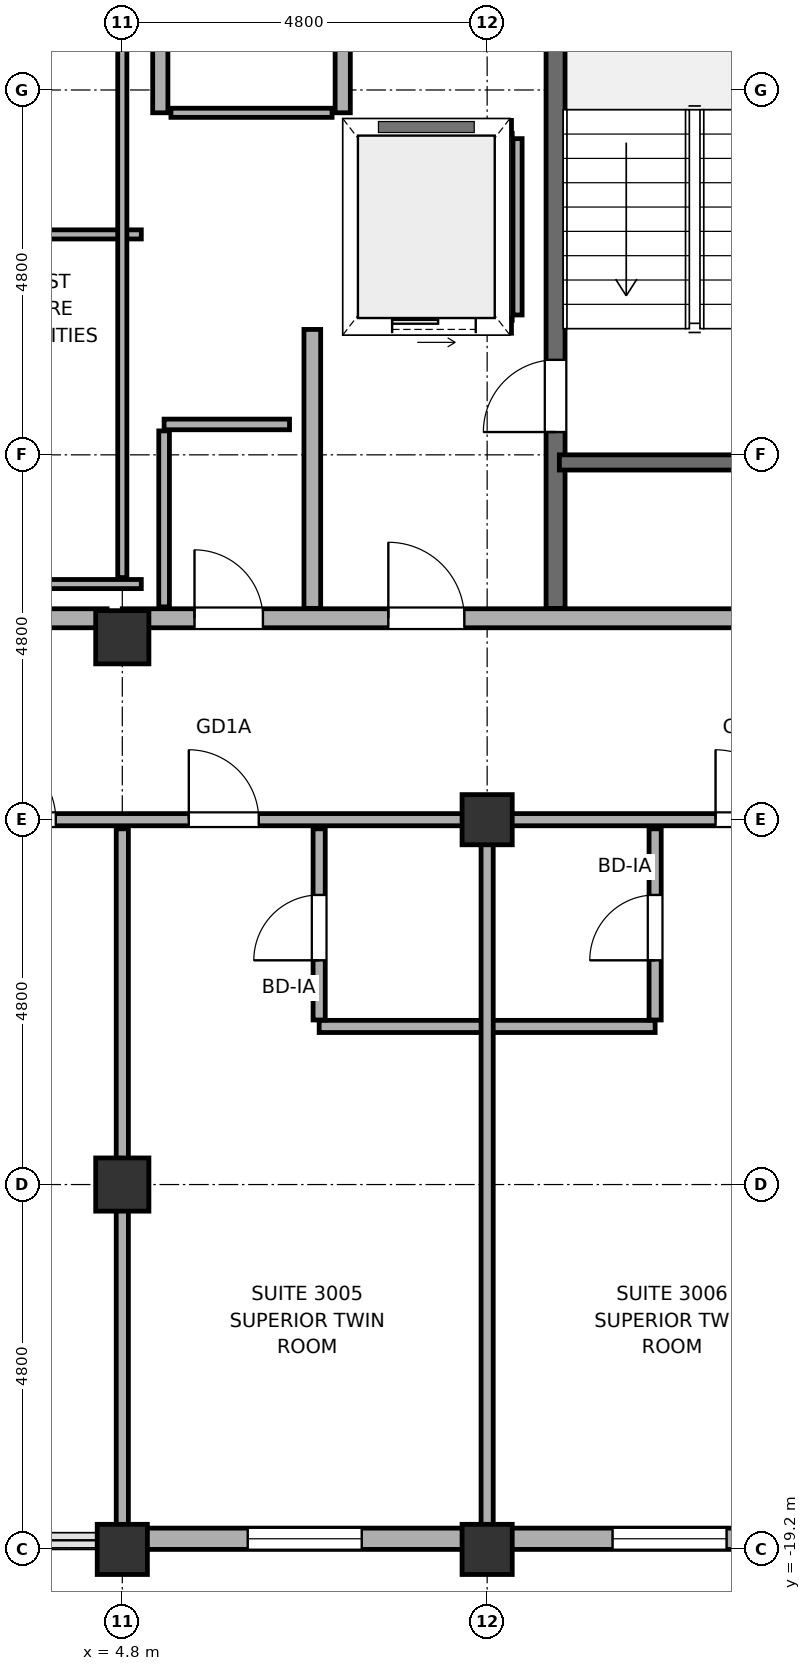
"""IFC4 building model, lengths in metres.
Left out: names, types, materials, properties, quantities, classifications, styles, units other than length and angle.
Written with IfcOpenShell. Run it as: python <this file> out.ifc"""

import sys

from ifc_helpers import new_model, si_unit, direction, frame, frame_2d, origin, origin_2d, place, context, subcontext, project, spatial, rectangle, hollow_rectangle, hollow_circle, extrude, element, fill, save


model = new_model("IFC4")
c1 = context("Model", 3, precision=1e-05, world=origin(), true_north=direction((0.0, 1.0)))
c2 = subcontext(c1, "Body", "Model", "MODEL_VIEW")
j1 = project(units=[si_unit("LENGTHUNIT", "METRE"), si_unit("PLANEANGLEUNIT", "RADIAN")], contexts=[c1])
p1 = place(None, origin())
s1 = spatial("IfcSite", under=j1, at=p1, CompositionType="ELEMENT")
p2 = place(p1, origin())
s2 = spatial("IfcBuilding", under=s1, at=p2, CompositionType="ELEMENT")
p3 = place(p2, frame((0.0, 0.0, 124.8)))
s3 = spatial("IfcBuildingStorey", under=s2, at=p3, CompositionType="ELEMENT", Elevation=124.8)
p4 = place(p3, frame((4.8, -19.2, 0.0), z_axis=(0.0, 0.0, 1.0), x_axis=(1.0, 0.0, 0.0)))
e1 = element("IfcColumn", 1, at=p4, inside=s3, PredefinedType="COLUMN", context=c2, shape_type="SweptSolid", body=[
    extrude(hollow_circle(Radius=0.33, WallThickness=0.028, at=origin_2d()), origin(), (0.0, 0.0, 1.0), 3.7),
])
for number, where, z_axis, x_axis in (
    (2, (4.8, -14.4, 0.0), (0.0, 0.0, 1.0), (1.0, 0.0, 0.0)),
    (3, (4.8, -7.2, 0.0), (0.0, 0.0, 1.0), (1.0, 0.0, 0.0)),
):
    element("IfcColumn", number, at=place(p3, frame(where, z_axis=z_axis, x_axis=x_axis)), inside=s3, PredefinedType="COLUMN", context=c2, shape_type="SweptSolid", body=[
        extrude(hollow_rectangle(XDim=0.7, YDim=0.7, WallThickness=0.032, at=origin_2d()), origin(), (0.0, 0.0, 1.0), 3.7),
    ])
for number, where, z_axis, x_axis in (
    (4, (9.6, -19.2, 0.0), (0.0, 0.0, 1.0), (1.0, 0.0, 0.0)),
    (5, (9.6, -9.6, 0.0), (0.0, 0.0, 1.0), (1.0, 0.0, 0.0)),
):
    element("IfcColumn", number, at=place(p3, frame(where, z_axis=z_axis, x_axis=x_axis)), inside=s3, PredefinedType="COLUMN", context=c2, shape_type="SweptSolid", body=[
        extrude(hollow_circle(Radius=0.33, WallThickness=0.028, at=origin_2d()), origin(), (0.0, 0.0, 1.0), 3.7),
    ])
p5 = place(p3, frame((4.75, -19.06, 0.0), z_axis=(0.0, 0.0, 1.0), x_axis=(1.0, 0.0, 0.0)))
e6 = element("IfcWall", 6, at=p5, inside=s3, PredefinedType="SOLIDWALL", context=c2, shape_type="SweptSolid", body=[
    extrude(rectangle(XDim=20.45, YDim=0.28, at=frame_2d((10.225, 0.0))), origin(), (0.0, 0.0, 1.0), 2.12),
])
p6 = place(p5, frame((11.817, 0.0, 0.75)))
e7 = element("IfcOpeningElement", 7, at=p6, cuts=e6, PredefinedType="OPENING", context=c2, shape_type="SweptSolid", body=[
    extrude(rectangle(XDim=1.5, YDim=1.15, at=frame_2d((0.75, 0.575))), frame((0.0, 0.155, 0.0), z_axis=(0.0, -1.0, 0.0), x_axis=(1.0, 0.0, 0.0)), (0.0, 0.0, 1.0), 0.31),
])
p7 = place(p5, frame((1.7, 0.0, 0.75)))
e8 = element("IfcOpeningElement", 8, at=p7, cuts=e6, PredefinedType="OPENING", context=c2, shape_type="SweptSolid", body=[
    extrude(rectangle(XDim=1.5, YDim=1.15, at=frame_2d((0.75, 0.575))), frame((0.0, 0.155, 0.0), z_axis=(0.0, -1.0, 0.0), x_axis=(1.0, 0.0, 0.0)), (0.0, 0.0, 1.0), 0.31),
])
p8 = place(p5, frame((6.5, 0.0, 0.75)))
e9 = element("IfcOpeningElement", 9, at=p8, cuts=e6, PredefinedType="OPENING", context=c2, shape_type="SweptSolid", body=[
    extrude(rectangle(XDim=1.5, YDim=1.15, at=frame_2d((0.75, 0.575))), frame((0.0, 0.155, 0.0), z_axis=(0.0, -1.0, 0.0), x_axis=(1.0, 0.0, 0.0)), (0.0, 0.0, 1.0), 0.31),
])
p9 = place(p3, frame((-4.6, -6.95, 0.0), z_axis=(0.0, 0.0, 1.0), x_axis=(1.0, 0.0, 0.0)))
e10 = element("IfcWall", 10, at=p9, inside=s3, PredefinedType="SOLIDWALL", context=c2, shape_type="SweptSolid", body=[
    extrude(rectangle(XDim=9.2, YDim=0.25, at=frame_2d((4.6, 0.0))), origin(), (0.0, 0.0, 1.0), 2.32),
])
p10 = place(p9, frame((0.8, 0.0, 0.0)))
e11 = element("IfcOpeningElement", 11, at=p10, cuts=e10, PredefinedType="OPENING", context=c2, shape_type="SweptSolid", body=[
    extrude(rectangle(XDim=1.2, YDim=2.2, at=frame_2d((0.6, 1.1))), frame((0.0, 0.14, 0.0), z_axis=(0.0, -1.0, 0.0), x_axis=(1.0, 0.0, 0.0)), (0.0, 0.0, 1.0), 0.28),
])
p11 = place(p9, frame((5.55, 0.0, 0.0)))
e12 = element("IfcOpeningElement", 12, at=p11, cuts=e10, PredefinedType="OPENING", context=c2, shape_type="SweptSolid", body=[
    extrude(rectangle(XDim=1.2, YDim=2.2, at=frame_2d((0.6, 1.1))), frame((0.0, 0.14, 0.0), z_axis=(0.0, -1.0, 0.0), x_axis=(1.0, 0.0, 0.0)), (0.0, 0.0, 1.0), 0.28),
])
p12 = place(p3, frame((4.8, -6.95, 0.0), z_axis=(0.0, 0.0, 1.0), x_axis=(1.0, 0.0, 0.0)))
e13 = element("IfcWall", 13, at=p12, inside=s3, PredefinedType="SOLIDWALL", context=c2, shape_type="SweptSolid", body=[
    extrude(rectangle(XDim=9.4, YDim=0.25, at=frame_2d((4.7, 0.0))), origin(), (0.0, 0.0, 1.0), 2.12),
])
p13 = place(p12, frame((3.5, 0.0, 0.0)))
e14 = element("IfcOpeningElement", 14, at=p13, cuts=e13, PredefinedType="OPENING", context=c2, shape_type="SweptSolid", body=[
    extrude(rectangle(XDim=1.0, YDim=2.02, at=frame_2d((0.5, 1.01))), frame((0.0, 0.14, 0.0), z_axis=(0.0, -1.0, 0.0), x_axis=(1.0, 0.0, 0.0)), (0.0, 0.0, 1.0), 0.28),
])
p14 = place(p12, frame((0.95, 0.0, 0.0)))
e15 = element("IfcOpeningElement", 15, at=p14, cuts=e13, PredefinedType="OPENING", context=c2, shape_type="SweptSolid", body=[
    extrude(rectangle(XDim=0.9, YDim=2.02, at=frame_2d((0.45, 1.01))), frame((0.0, 0.14, 0.0), z_axis=(0.0, -1.0, 0.0), x_axis=(1.0, 0.0, 0.0)), (0.0, 0.0, 1.0), 0.28),
])
p15 = place(p3, frame((7.3, -6.82, 0.0), z_axis=(0.0, 0.0, 1.0), x_axis=(0.0, 1.0, 0.0)))
e16 = element("IfcWall", 16, at=p15, inside=s3, PredefinedType="SOLIDWALL", context=c2, shape_type="SweptSolid", body=[
    extrude(rectangle(XDim=3.67, YDim=0.22, at=frame_2d((1.835, 0.0))), origin(), (0.0, 0.0, 1.0), 2.12),
])
p16 = place(p3, frame((10.5, -6.82, -0.18), z_axis=(0.0, 0.0, 1.0), x_axis=(0.0, 1.0, 0.0)))
e17 = element("IfcWall", 17, at=p16, inside=s3, PredefinedType="SOLIDWALL", context=c2, shape_type="SweptSolid", body=[
    extrude(rectangle(XDim=13.64, YDim=0.25, at=frame_2d((6.82, 0.0))), origin(), (0.0, 0.0, 1.0), 3.7),
])
p17 = place(p16, frame((2.32, 0.0, 0.18)))
e18 = element("IfcOpeningElement", 18, at=p17, cuts=e17, PredefinedType="OPENING", context=c2, shape_type="SweptSolid", body=[
    extrude(rectangle(XDim=0.95, YDim=2.15, at=frame_2d((0.475, 1.075))), frame((0.0, 0.14, 0.0), z_axis=(0.0, -1.0, 0.0), x_axis=(1.0, 0.0, 0.0)), (0.0, 0.0, 1.0), 0.28),
])
p18 = place(p3, frame((10.55, -4.9, -0.18), z_axis=(0.0, 0.0, 1.0), x_axis=(1.0, 0.0, 0.0)))
e19 = element("IfcWall", 19, at=p18, inside=s3, PredefinedType="SOLIDWALL", context=c2, shape_type="SweptSolid", body=[
    extrude(rectangle(XDim=3.65, YDim=0.2, at=frame_2d((1.825, 0.0))), origin(), (0.0, 0.0, 1.0), 3.7),
])
for number, where, z_axis, x_axis in (
    (20, (7.7, -0.3, 0.0), (0.0, 0.0, 1.0), (0.0, 1.0, 0.0)),
    (21, (5.3, -0.3, 0.0), (0.0, 0.0, 1.0), (0.0, 1.0, 0.0)),
):
    element("IfcWall", number, at=place(p3, frame(where, z_axis=z_axis, x_axis=x_axis)), inside=s3, PredefinedType="SOLIDWALL", context=c2, shape_type="SweptSolid", body=[
        extrude(rectangle(XDim=6.8, YDim=0.2, at=frame_2d((3.4, 0.0))), origin(), (0.0, 0.0, 1.0), 3.52),
    ])
p19 = place(p3, frame((5.44, -0.3, 0.0), z_axis=(0.0, 0.0, 1.0), x_axis=(1.0, 0.0, 0.0)))
e22 = element("IfcWall", 22, at=p19, inside=s3, PredefinedType="PARTITIONING", context=c2, shape_type="SweptSolid", body=[
    extrude(rectangle(XDim=2.12, YDim=0.12, at=frame_2d((1.06, 0.0))), origin(), (0.0, 0.0, 1.0), 3.52),
])
p20 = place(p3, frame((7.88, -3.1, 0.0), z_axis=(0.0, 0.0, 1.0), x_axis=(1.0, 0.0, 0.0)))
e23 = element("IfcWall", 23, at=p20, inside=s3, PredefinedType="SOLIDWALL", context=c2, shape_type="SweptSolid", body=[
    extrude(rectangle(XDim=2.04, YDim=0.2, at=frame_2d((1.02, 0.0))), origin(), (0.0, 0.0, 1.0), 3.52),
])
p21 = place(p20, frame((0.47, 0.0, 0.0)))
e24 = element("IfcOpeningElement", 24, at=p21, cuts=e23, PredefinedType="OPENING", context=c2, shape_type="SweptSolid", body=[
    extrude(rectangle(XDim=1.1, YDim=2.2, at=frame_2d((0.55, 1.1))), frame((0.0, 0.115, 0.0), z_axis=(0.0, -1.0, 0.0), x_axis=(1.0, 0.0, 0.0)), (0.0, 0.0, 1.0), 0.23),
])
p22 = place(p3, frame((7.88, -0.5, 0.0), z_axis=(0.0, 0.0, 1.0), x_axis=(1.0, 0.0, 0.0)))
e25 = element("IfcWall", 25, at=p22, inside=s3, PredefinedType="SOLIDWALL", context=c2, shape_type="SweptSolid", body=[
    extrude(rectangle(XDim=2.04, YDim=0.2, at=frame_2d((1.02, 0.0))), origin(), (0.0, 0.0, 1.0), 3.52),
])
for number, where, z_axis, x_axis in (
    (26, (7.8, -2.96, 0.0), (0.0, 0.0, 1.0), (0.0, 1.0, 0.0)),
    (27, (10.0, -2.96, 0.0), (0.0, 0.0, 1.0), (0.0, 1.0, 0.0)),
):
    element("IfcWall", number, at=place(p3, frame(where, z_axis=z_axis, x_axis=x_axis)), inside=s3, PredefinedType="PARTITIONING", context=c2, shape_type="SweptSolid", body=[
        extrude(rectangle(XDim=2.32, YDim=0.12, at=frame_2d((1.16, 0.0))), origin(), (0.0, 0.0, 1.0), 3.52),
    ])
p23 = place(p3, frame((7.39, -12.32, 0.0), z_axis=(0.0, 0.0, 1.0), x_axis=(1.0, 0.0, 0.0)))
e28 = element("IfcWall", 28, at=p23, inside=s3, PredefinedType="PARTITIONING", context=c2, shape_type="SweptSolid", body=[
    extrude(rectangle(XDim=4.42, YDim=0.16, at=frame_2d((2.21, 0.0))), origin(), (0.0, 0.0, 1.0), 3.12),
])
p24 = place(p3, frame((-14.32, -9.6, 0.0), z_axis=(0.0, 0.0, 1.0), x_axis=(1.0, 0.0, 0.0)))
e29 = element("IfcWall", 29, at=p24, inside=s3, PredefinedType="PARTITIONING", context=c2, shape_type="SweptSolid", body=[
    extrude(rectangle(XDim=28.64, YDim=0.16, at=frame_2d((14.32, 0.0))), origin(), (0.0, 0.0, 1.0), 2.12),
])
p25 = place(p24, frame((0.795, 0.0, 0.0)))
e30 = element("IfcOpeningElement", 30, at=p25, cuts=e29, PredefinedType="OPENING", context=c2, shape_type="SweptSolid", body=[
    extrude(rectangle(XDim=0.92, YDim=2.02, at=frame_2d((0.46, 1.01))), frame((0.0, 0.095, 0.0), z_axis=(0.0, -1.0, 0.0), x_axis=(1.0, 0.0, 0.0)), (0.0, 0.0, 1.0), 0.19),
])
p26 = place(p24, frame((7.725, 0.0, 0.0)))
e31 = element("IfcOpeningElement", 31, at=p26, cuts=e29, PredefinedType="OPENING", context=c2, shape_type="SweptSolid", body=[
    extrude(rectangle(XDim=0.92, YDim=2.02, at=frame_2d((0.46, 1.01))), frame((0.0, 0.095, 0.0), z_axis=(0.0, -1.0, 0.0), x_axis=(1.0, 0.0, 0.0)), (0.0, 0.0, 1.0), 0.19),
])
p27 = place(p24, frame((10.395, 0.0, 0.0)))
e32 = element("IfcOpeningElement", 32, at=p27, cuts=e29, PredefinedType="OPENING", context=c2, shape_type="SweptSolid", body=[
    extrude(rectangle(XDim=0.92, YDim=2.02, at=frame_2d((0.46, 1.01))), frame((0.0, 0.095, 0.0), z_axis=(0.0, -1.0, 0.0), x_axis=(1.0, 0.0, 0.0)), (0.0, 0.0, 1.0), 0.19),
])
p28 = place(p24, frame((17.325, 0.0, 0.0)))
e33 = element("IfcOpeningElement", 33, at=p28, cuts=e29, PredefinedType="OPENING", context=c2, shape_type="SweptSolid", body=[
    extrude(rectangle(XDim=0.92, YDim=2.02, at=frame_2d((0.46, 1.01))), frame((0.0, 0.095, 0.0), z_axis=(0.0, -1.0, 0.0), x_axis=(1.0, 0.0, 0.0)), (0.0, 0.0, 1.0), 0.19),
])
p29 = place(p24, frame((19.995, 0.0, 0.0)))
e34 = element("IfcOpeningElement", 34, at=p29, cuts=e29, PredefinedType="OPENING", context=c2, shape_type="SweptSolid", body=[
    extrude(rectangle(XDim=0.92, YDim=2.02, at=frame_2d((0.46, 1.01))), frame((0.0, 0.095, 0.0), z_axis=(0.0, -1.0, 0.0), x_axis=(1.0, 0.0, 0.0)), (0.0, 0.0, 1.0), 0.19),
])
p30 = place(p24, frame((26.925, 0.0, 0.0)))
e35 = element("IfcOpeningElement", 35, at=p30, cuts=e29, PredefinedType="OPENING", context=c2, shape_type="SweptSolid", body=[
    extrude(rectangle(XDim=0.92, YDim=2.02, at=frame_2d((0.46, 1.01))), frame((0.0, 0.095, 0.0), z_axis=(0.0, -1.0, 0.0), x_axis=(1.0, 0.0, 0.0)), (0.0, 0.0, 1.0), 0.19),
])
p31 = place(p3, frame((2.6, -6.5, 0.0), z_axis=(0.0, 0.0, 1.0), x_axis=(1.0, 0.0, 0.0)))
e36 = element("IfcWall", 36, at=p31, inside=s3, PredefinedType="PARTITIONING", context=c2, shape_type="SweptSolid", body=[
    extrude(rectangle(XDim=2.45, YDim=0.12, at=frame_2d((1.225, 0.0))), origin(), (0.0, 0.0, 1.0), 3.52),
])
p32 = place(p3, frame((5.35, -4.4, 0.0), z_axis=(0.0, 0.0, 1.0), x_axis=(1.0, 0.0, 0.0)))
e37 = element("IfcWall", 37, at=p32, inside=s3, PredefinedType="PLUMBINGWALL", context=c2, shape_type="SweptSolid", body=[
    extrude(rectangle(XDim=1.65, YDim=0.14, at=frame_2d((0.825, 0.0))), origin(), (0.0, 0.0, 1.0), 3.52),
])
p33 = place(p3, frame((2.6, -1.9, 0.0), z_axis=(0.0, 0.0, 1.0), x_axis=(1.0, 0.0, 0.0)))
e38 = element("IfcWall", 38, at=p33, inside=s3, PredefinedType="PARTITIONING", context=c2, shape_type="SweptSolid", body=[
    extrude(rectangle(XDim=2.45, YDim=0.12, at=frame_2d((1.225, 0.0))), origin(), (0.0, 0.0, 1.0), 3.52),
])
p34 = place(p3, frame((4.8, -18.91, 0.0), z_axis=(0.0, 0.0, 1.0), x_axis=(0.0, 1.0, 0.0)))
e39 = element("IfcWall", 39, at=p34, inside=s3, PredefinedType="PARTITIONING", context=c2, shape_type="SweptSolid", body=[
    extrude(rectangle(XDim=9.19, YDim=0.16, at=frame_2d((4.595, 0.0))), origin(), (0.0, 0.0, 1.0), 2.12),
])
p35 = place(p3, frame((4.8, -6.415, 0.0), z_axis=(0.0, 0.0, 1.0), x_axis=(0.0, 1.0, 0.0)))
e40 = element("IfcWall", 40, at=p35, inside=s3, PredefinedType="PARTITIONING", context=c2, shape_type="SweptSolid", body=[
    extrude(rectangle(XDim=9.165, YDim=0.12, at=frame_2d((4.583, 0.0))), origin(), (0.0, 0.0, 1.0), 3.52),
])
p36 = place(p3, frame((5.35, -6.8, 0.0), z_axis=(0.0, 0.0, 1.0), x_axis=(0.0, 1.0, 0.0)))
e41 = element("IfcWall", 41, at=p36, inside=s3, PredefinedType="PLUMBINGWALL", context=c2, shape_type="SweptSolid", body=[
    extrude(rectangle(XDim=2.315, YDim=0.14, at=frame_2d((1.157, 0.0))), origin(), (0.0, 0.0, 1.0), 2.12),
])
p37 = place(p3, frame((7.39, -12.235, 0.0), z_axis=(0.0, 0.0, 1.0), x_axis=(0.0, 1.0, 0.0)))
e42 = element("IfcWall", 42, at=p37, inside=s3, PredefinedType="PARTITIONING", context=c2, shape_type="SweptSolid", body=[
    extrude(rectangle(XDim=2.515, YDim=0.16, at=frame_2d((1.258, 0.0))), origin(), (0.0, 0.0, 1.0), 2.12),
])
p38 = place(p37, frame((0.785, 0.0, 0.0)))
e43 = element("IfcOpeningElement", 43, at=p38, cuts=e42, PredefinedType="OPENING", context=c2, shape_type="SweptSolid", body=[
    extrude(rectangle(XDim=0.86, YDim=2.02, at=frame_2d((0.43, 1.01))), frame((0.0, 0.095, 0.0), z_axis=(0.0, -1.0, 0.0), x_axis=(1.0, 0.0, 0.0)), (0.0, 0.0, 1.0), 0.19),
])
p39 = place(p3, frame((9.6, -18.91, 0.0), z_axis=(0.0, 0.0, 1.0), x_axis=(0.0, 1.0, 0.0)))
e44 = element("IfcWall", 44, at=p39, inside=s3, PredefinedType="PARTITIONING", context=c2, shape_type="SweptSolid", body=[
    extrude(rectangle(XDim=9.19, YDim=0.16, at=frame_2d((4.595, 0.0))), origin(), (0.0, 0.0, 1.0), 2.12),
])
p40 = place(p3, frame((11.81, -12.235, 0.0), z_axis=(0.0, 0.0, 1.0), x_axis=(0.0, 1.0, 0.0)))
e45 = element("IfcWall", 45, at=p40, inside=s3, PredefinedType="PARTITIONING", context=c2, shape_type="SweptSolid", body=[
    extrude(rectangle(XDim=2.515, YDim=0.16, at=frame_2d((1.258, 0.0))), origin(), (0.0, 0.0, 1.0), 2.12),
])
p41 = place(p40, frame((0.785, 0.0, 0.0)))
e46 = element("IfcOpeningElement", 46, at=p41, cuts=e45, PredefinedType="OPENING", context=c2, shape_type="SweptSolid", body=[
    extrude(rectangle(XDim=0.86, YDim=2.02, at=frame_2d((0.43, 1.01))), frame((0.0, 0.095, 0.0), z_axis=(0.0, -1.0, 0.0), x_axis=(1.0, 0.0, 0.0)), (0.0, 0.0, 1.0), 0.19),
])
p42 = place(p7, origin())
e47 = element("IfcWindow", 47, at=p42, inside=s3, PartitioningType="SINGLE_PANEL", PredefinedType="WINDOW", context=c2, shape_type="SweptSolid", body=[
    extrude(rectangle(XDim=1.5, YDim=1.15, at=frame_2d((0.75, 0.575))), frame((0.0, 0.03, 0.0), z_axis=(0.0, -1.0, 0.0), x_axis=(1.0, 0.0, 0.0)), (0.0, 0.0, 1.0), 0.06),
])
fill(e8, e47)
p43 = place(p8, origin())
e48 = element("IfcWindow", 48, at=p43, inside=s3, PartitioningType="SINGLE_PANEL", PredefinedType="WINDOW", context=c2, shape_type="SweptSolid", body=[
    extrude(rectangle(XDim=1.5, YDim=1.15, at=frame_2d((0.75, 0.575))), frame((0.0, 0.03, 0.0), z_axis=(0.0, -1.0, 0.0), x_axis=(1.0, 0.0, 0.0)), (0.0, 0.0, 1.0), 0.06),
])
fill(e9, e48)
p44 = place(p13, origin())
e49 = element("IfcDoor", 49, at=p44, inside=s3, OperationType="SINGLE_SWING_RIGHT", PredefinedType="DOOR", context=c2, shape_type="SweptSolid", body=[
    extrude(rectangle(XDim=1.0, YDim=2.02, at=frame_2d((0.5, 1.01))), frame((0.0, 0.025, 0.0), z_axis=(0.0, -1.0, 0.0), x_axis=(1.0, 0.0, 0.0)), (0.0, 0.0, 1.0), 0.05),
])
fill(e14, e49)
p45 = place(p17, origin())
e50 = element("IfcDoor", 50, at=p45, inside=s3, OperationType="SINGLE_SWING_RIGHT", PredefinedType="DOOR", context=c2, shape_type="SweptSolid", body=[
    extrude(rectangle(XDim=0.95, YDim=2.15, at=frame_2d((0.475, 1.075))), frame((0.0, 0.025, 0.0), z_axis=(0.0, -1.0, 0.0), x_axis=(1.0, 0.0, 0.0)), (0.0, 0.0, 1.0), 0.05),
])
fill(e18, e50)
p46 = place(p21, origin())
e51 = element("IfcDoor", 51, at=p46, inside=s3, OperationType="SLIDING_TO_LEFT", PredefinedType="DOOR", context=c2, shape_type="SweptSolid", body=[
    extrude(rectangle(XDim=1.1, YDim=2.2, at=frame_2d((0.55, 1.1))), frame((0.0, 0.025, 0.0), z_axis=(0.0, -1.0, 0.0), x_axis=(1.0, 0.0, 0.0)), (0.0, 0.0, 1.0), 0.05),
])
fill(e24, e51)
p47 = place(p14, origin())
e52 = element("IfcDoor", 52, at=p47, inside=s3, OperationType="SINGLE_SWING_RIGHT", PredefinedType="DOOR", context=c2, shape_type="SweptSolid", body=[
    extrude(rectangle(XDim=0.9, YDim=2.02, at=frame_2d((0.45, 1.01))), frame((0.0, 0.025, 0.0), z_axis=(0.0, -1.0, 0.0), x_axis=(1.0, 0.0, 0.0)), (0.0, 0.0, 1.0), 0.05),
])
fill(e15, e52)
p48 = place(p28, origin())
e53 = element("IfcDoor", 53, at=p48, inside=s3, OperationType="SINGLE_SWING_RIGHT", PredefinedType="DOOR", context=c2, shape_type="SweptSolid", body=[
    extrude(rectangle(XDim=0.92, YDim=2.02, at=frame_2d((0.46, 1.01))), frame((0.0, 0.025, 0.0), z_axis=(0.0, -1.0, 0.0), x_axis=(1.0, 0.0, 0.0)), (0.0, 0.0, 1.0), 0.05),
])
fill(e33, e53)
p49 = place(p29, origin())
e54 = element("IfcDoor", 54, at=p49, inside=s3, OperationType="SINGLE_SWING_RIGHT", PredefinedType="DOOR", context=c2, shape_type="SweptSolid", body=[
    extrude(rectangle(XDim=0.92, YDim=2.02, at=frame_2d((0.46, 1.01))), frame((0.0, 0.025, 0.0), z_axis=(0.0, -1.0, 0.0), x_axis=(1.0, 0.0, 0.0)), (0.0, 0.0, 1.0), 0.05),
])
fill(e34, e54)
p50 = place(p38, origin())
e55 = element("IfcDoor", 55, at=p50, inside=s3, OperationType="SINGLE_SWING_LEFT", PredefinedType="DOOR", context=c2, shape_type="SweptSolid", body=[
    extrude(rectangle(XDim=0.86, YDim=2.02, at=frame_2d((0.43, 1.01))), frame((0.0, 0.025, 0.0), z_axis=(0.0, -1.0, 0.0), x_axis=(1.0, 0.0, 0.0)), (0.0, 0.0, 1.0), 0.05),
])
fill(e43, e55)
p51 = place(p30, origin())
e56 = element("IfcDoor", 56, at=p51, inside=s3, OperationType="SINGLE_SWING_LEFT", PredefinedType="DOOR", context=c2, shape_type="SweptSolid", body=[
    extrude(rectangle(XDim=0.92, YDim=2.02, at=frame_2d((0.46, 1.01))), frame((0.0, 0.025, 0.0), z_axis=(0.0, -1.0, 0.0), x_axis=(1.0, 0.0, 0.0)), (0.0, 0.0, 1.0), 0.05),
])
fill(e35, e56)
p52 = place(p41, origin())
e57 = element("IfcDoor", 57, at=p52, inside=s3, OperationType="SINGLE_SWING_LEFT", PredefinedType="DOOR", context=c2, shape_type="SweptSolid", body=[
    extrude(rectangle(XDim=0.86, YDim=2.02, at=frame_2d((0.43, 1.01))), frame((0.0, 0.025, 0.0), z_axis=(0.0, -1.0, 0.0), x_axis=(1.0, 0.0, 0.0)), (0.0, 0.0, 1.0), 0.05),
])
fill(e46, e57)
save(model, sys.argv[1])
